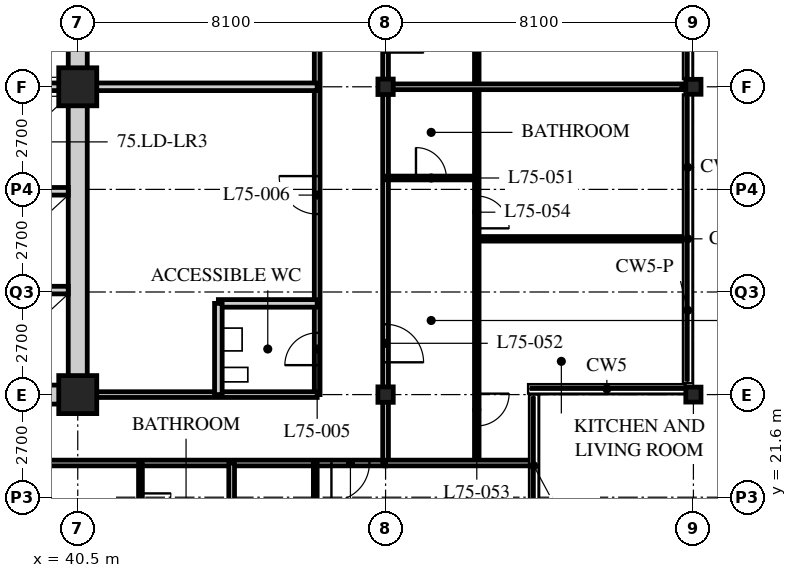
"""IFC4 building model, lengths in metres.
Left out: names, types, materials, properties, quantities, classifications, styles, units other than length and angle.
Written with IfcOpenShell. Run it as: python <this file> out.ifc"""

import sys

from ifc_helpers import new_model, si_unit, direction, frame, frame_2d, origin, origin_2d, place, context, subcontext, project, spatial, rectangle, hollow_rectangle, i_section, extrude, element, fill, save


model = new_model("IFC4")
c1 = context("Model", 3, precision=1e-05, world=origin(), true_north=direction((0.0, 1.0)))
c2 = subcontext(c1, "Body", "Model", "MODEL_VIEW")
j1 = project(units=[si_unit("LENGTHUNIT", "METRE"), si_unit("PLANEANGLEUNIT", "RADIAN")], contexts=[c1])
p1 = place(None, origin())
s1 = spatial("IfcSite", under=j1, at=p1, CompositionType="ELEMENT")
p2 = place(p1, origin())
s2 = spatial("IfcBuilding", under=s1, at=p2, CompositionType="ELEMENT")
p3 = place(p2, frame((0.0, 0.0, 293.1)))
s3 = spatial("IfcBuildingStorey", under=s2, at=p3, CompositionType="ELEMENT", Elevation=293.1)
for number, where, z_axis, x_axis in (
    (1, (40.5, 24.3, 0.0), (0.0, 0.0, 1.0), (1.0, 0.0, 0.0)),
    (2, (40.5, 32.4, 0.0), (0.0, 0.0, 1.0), (1.0, 0.0, 0.0)),
):
    element("IfcColumn", number, at=place(p3, frame(where, z_axis=z_axis, x_axis=x_axis)), inside=s3, PredefinedType="COLUMN", context=c2, shape_type="SweptSolid", body=[
        extrude(hollow_rectangle(XDim=1.0, YDim=1.0, WallThickness=0.1, at=origin_2d()), origin(), (0.0, 0.0, 1.0), 5.4),
    ])
for number, where, z_axis, x_axis in (
    (3, (48.6, 24.3, 0.0), (0.0, 0.0, 1.0), (1.0, 0.0, 0.0)),
    (4, (48.6, 32.4, 0.0), (0.0, 0.0, 1.0), (1.0, 0.0, 0.0)),
):
    element("IfcColumn", number, at=place(p3, frame(where, z_axis=z_axis, x_axis=x_axis)), inside=s3, PredefinedType="COLUMN", context=c2, shape_type="SweptSolid", body=[
        extrude(i_section(OverallWidth=0.403, OverallDepth=0.406, WebThickness=0.027, FlangeThickness=0.043, FilletRadius=0.015, at=origin_2d()), origin(), (0.0, 0.0, 1.0), 5.4),
    ])
for number, where, z_axis, x_axis in (
    (5, (56.7, 24.3, 0.0), (0.0, 0.0, 1.0), (1.0, 0.0, 0.0)),
    (6, (56.7, 32.4, 0.0), (0.0, 0.0, 1.0), (1.0, 0.0, 0.0)),
):
    element("IfcColumn", number, at=place(p3, frame(where, z_axis=z_axis, x_axis=x_axis)), inside=s3, PredefinedType="COLUMN", context=c2, shape_type="SweptSolid", body=[
        extrude(i_section(OverallWidth=0.399, OverallDepth=0.394, WebThickness=0.023, FlangeThickness=0.037, FilletRadius=0.015, at=origin_2d()), origin(), (0.0, 0.0, 1.0), 5.4),
    ])
p4 = place(p3, frame((8.1, 22.5, 0.0), z_axis=(0.0, 0.0, 1.0), x_axis=(1.0, 0.0, 0.0)))
e7 = element("IfcWall", 7, at=p4, inside=s3, PredefinedType="PARTITIONING", context=c2, shape_type="SweptSolid", body=[
    extrude(rectangle(XDim=40.5, YDim=0.15, at=frame_2d((20.25, 0.0))), origin(), (0.0, 0.0, 1.0), 5.19),
])
p5 = place(p4, frame((11.25, 0.0, 0.0)))
e8 = element("IfcOpeningElement", 8, at=p5, cuts=e7, PredefinedType="OPENING", context=c2, shape_type="SweptSolid", body=[
    extrude(rectangle(XDim=1.8, YDim=2.4, at=frame_2d((0.9, 1.2))), frame((0.0, 0.085, 0.0), z_axis=(0.0, -1.0, 0.0), x_axis=(1.0, 0.0, 0.0)), (0.0, 0.0, 1.0), 0.17),
])
p6 = place(p4, frame((23.4, 0.0, 0.0)))
e9 = element("IfcOpeningElement", 9, at=p6, cuts=e7, PredefinedType="OPENING", context=c2, shape_type="SweptSolid", body=[
    extrude(rectangle(XDim=1.8, YDim=2.4, at=frame_2d((0.9, 1.2))), frame((0.0, 0.085, 0.0), z_axis=(0.0, -1.0, 0.0), x_axis=(1.0, 0.0, 0.0)), (0.0, 0.0, 1.0), 0.17),
])
p7 = place(p4, frame((28.75, 0.0, 0.0)))
e10 = element("IfcOpeningElement", 10, at=p7, cuts=e7, PredefinedType="OPENING", context=c2, shape_type="SweptSolid", body=[
    extrude(rectangle(XDim=1.0, YDim=2.1, at=frame_2d((0.5, 1.05))), frame((0.0, 0.085, 0.0), z_axis=(0.0, -1.0, 0.0), x_axis=(1.0, 0.0, 0.0)), (0.0, 0.0, 1.0), 0.17),
])
p8 = place(p4, frame((0.425, 0.0, 0.0)))
e11 = element("IfcOpeningElement", 11, at=p8, cuts=e7, PredefinedType="OPENING", context=c2, shape_type="SweptSolid", body=[
    extrude(rectangle(XDim=1.0, YDim=2.1, at=frame_2d((0.5, 1.05))), frame((0.0, 0.085, 0.0), z_axis=(0.0, -1.0, 0.0), x_axis=(1.0, 0.0, 0.0)), (0.0, 0.0, 1.0), 0.17),
])
p9 = place(p4, frame((39.075, 0.0, 0.0)))
e12 = element("IfcOpeningElement", 12, at=p9, cuts=e7, PredefinedType="OPENING", context=c2, shape_type="SweptSolid", body=[
    extrude(rectangle(XDim=1.0, YDim=2.1, at=frame_2d((0.5, 1.05))), frame((0.0, 0.085, 0.0), z_axis=(0.0, -1.0, 0.0), x_axis=(1.0, 0.0, 0.0)), (0.0, 0.0, 1.0), 0.17),
])
p10 = place(p3, frame((48.6, 22.5, 0.0), z_axis=(0.0, 0.0, 1.0), x_axis=(0.0, 1.0, 0.0)))
e13 = element("IfcWall", 13, at=p10, inside=s3, PredefinedType="PARTITIONING", context=c2, shape_type="SweptSolid", body=[
    extrude(rectangle(XDim=34.2, YDim=0.15, at=frame_2d((17.1, 0.0))), origin(), (0.0, 0.0, 1.0), 4.271),
])
p11 = place(p10, frame((2.65, 0.0, 0.0)))
e14 = element("IfcOpeningElement", 14, at=p11, cuts=e13, PredefinedType="OPENING", context=c2, shape_type="SweptSolid", body=[
    extrude(rectangle(XDim=1.0, YDim=2.1, at=frame_2d((0.5, 1.05))), frame((0.0, 0.085, 0.0), z_axis=(0.0, -1.0, 0.0), x_axis=(1.0, 0.0, 0.0)), (0.0, 0.0, 1.0), 0.17),
])
p12 = place(p10, frame((10.8, 0.0, 0.0)))
e15 = element("IfcOpeningElement", 15, at=p12, cuts=e13, PredefinedType="OPENING", context=c2, shape_type="SweptSolid", body=[
    extrude(rectangle(XDim=1.0, YDim=2.1, at=frame_2d((0.5, 1.05))), frame((0.0, 0.085, 0.0), z_axis=(0.0, -1.0, 0.0), x_axis=(1.0, 0.0, 0.0)), (0.0, 0.0, 1.0), 0.17),
])
p13 = place(p10, frame((18.9, 0.0, 0.0)))
e16 = element("IfcOpeningElement", 16, at=p13, cuts=e13, PredefinedType="OPENING", context=c2, shape_type="SweptSolid", body=[
    extrude(rectangle(XDim=1.0, YDim=2.1, at=frame_2d((0.5, 1.05))), frame((0.0, 0.085, 0.0), z_axis=(0.0, -1.0, 0.0), x_axis=(1.0, 0.0, 0.0)), (0.0, 0.0, 1.0), 0.17),
])
p14 = place(p10, frame((27.0, 0.0, 0.0)))
e17 = element("IfcOpeningElement", 17, at=p14, cuts=e13, PredefinedType="OPENING", context=c2, shape_type="SweptSolid", body=[
    extrude(rectangle(XDim=1.0, YDim=2.1, at=frame_2d((0.5, 1.05))), frame((0.0, 0.085, 0.0), z_axis=(0.0, -1.0, 0.0), x_axis=(1.0, 0.0, 0.0)), (0.0, 0.0, 1.0), 0.17),
])
p15 = place(p3, frame((46.8, 24.3, 0.0), z_axis=(0.0, 0.0, 1.0), x_axis=(0.0, 1.0, 0.0)))
e18 = element("IfcWall", 18, at=p15, inside=s3, PredefinedType="PARTITIONING", context=c2, shape_type="SweptSolid", body=[
    extrude(rectangle(XDim=30.6, YDim=0.15, at=frame_2d((15.3, 0.0))), origin(), (0.0, 0.0, 1.0), 5.19),
])
p16 = place(p15, frame((0.775, 0.0, 0.0)))
e19 = element("IfcOpeningElement", 19, at=p16, cuts=e18, PredefinedType="OPENING", context=c2, shape_type="SweptSolid", body=[
    extrude(rectangle(XDim=0.85, YDim=2.1, at=frame_2d((0.425, 1.05))), frame((0.0, 0.085, 0.0), z_axis=(0.0, -1.0, 0.0), x_axis=(1.0, 0.0, 0.0)), (0.0, 0.0, 1.0), 0.17),
])
p17 = place(p15, frame((4.75, 0.0, 0.0)))
e20 = element("IfcOpeningElement", 20, at=p17, cuts=e18, PredefinedType="OPENING", context=c2, shape_type="SweptSolid", body=[
    extrude(rectangle(XDim=1.0, YDim=2.1, at=frame_2d((0.5, 1.05))), frame((0.0, 0.085, 0.0), z_axis=(0.0, -1.0, 0.0), x_axis=(1.0, 0.0, 0.0)), (0.0, 0.0, 1.0), 0.17),
])
p18 = place(p15, frame((11.65, 0.0, 0.0)))
e21 = element("IfcOpeningElement", 21, at=p18, cuts=e18, PredefinedType="OPENING", context=c2, shape_type="SweptSolid", body=[
    extrude(rectangle(XDim=1.0, YDim=2.1, at=frame_2d((0.5, 1.05))), frame((0.0, 0.085, 0.0), z_axis=(0.0, -1.0, 0.0), x_axis=(1.0, 0.0, 0.0)), (0.0, 0.0, 1.0), 0.17),
])
p19 = place(p3, frame((40.7, 24.3, 0.0), z_axis=(0.0, 0.0, 1.0), x_axis=(1.0, 0.0, 0.0)))
e22 = element("IfcWall", 22, at=p19, inside=s3, PredefinedType="PARTITIONING", context=c2, shape_type="SweptSolid", body=[
    extrude(rectangle(XDim=6.1, YDim=0.15, at=frame_2d((3.05, 0.0))), origin(), (0.0, 0.0, 1.0), 4.271),
])
p20 = place(p3, frame((40.5, 32.4, 0.0), z_axis=(0.0, 0.0, 1.0), x_axis=(1.0, 0.0, 0.0)))
e23 = element("IfcWall", 23, at=p20, inside=s3, PredefinedType="SOLIDWALL", context=c2, shape_type="SweptSolid", body=[
    extrude(rectangle(XDim=6.3, YDim=0.2, at=frame_2d((3.15, 0.0))), origin(), (0.0, 0.0, 1.0), 4.271),
])
p21 = place(p3, frame((46.8, 26.7, 0.0), z_axis=(0.0, 0.0, 1.0), x_axis=(-1.0, 0.0, 0.0)))
e24 = element("IfcWall", 24, at=p21, inside=s3, PredefinedType="SOLIDWALL", context=c2, shape_type="SweptSolid", body=[
    extrude(rectangle(XDim=2.6, YDim=0.2, at=frame_2d((1.3, 0.0))), origin(), (0.0, 0.0, 1.0), 5.19),
])
p22 = place(p3, frame((44.2, 24.3, 0.0), z_axis=(0.0, 0.0, 1.0), x_axis=(0.0, 1.0, 0.0)))
e25 = element("IfcWall", 25, at=p22, inside=s3, PredefinedType="SOLIDWALL", context=c2, shape_type="SweptSolid", body=[
    extrude(rectangle(XDim=2.4, YDim=0.2, at=frame_2d((1.2, 0.0))), origin(), (0.0, 0.0, 1.0), 5.19),
])
p23 = place(p3, frame((42.15, 22.5, 0.0), z_axis=(0.0, 0.0, 1.0), x_axis=(0.0, -1.0, 0.0)))
e26 = element("IfcWall", 26, at=p23, inside=s3, PredefinedType="PARTITIONING", context=c2, shape_type="SweptSolid", body=[
    extrude(rectangle(XDim=2.4, YDim=0.1, at=frame_2d((1.2, 0.0))), origin(), (0.0, 0.0, 1.0), 5.19),
])
p24 = place(p23, frame((0.8, 0.0, 0.0)))
e27 = element("IfcOpeningElement", 27, at=p24, cuts=e26, PredefinedType="OPENING", context=c2, shape_type="SweptSolid", body=[
    extrude(rectangle(XDim=0.8, YDim=2.1, at=frame_2d((0.4, 1.05))), frame((0.0, 0.06, 0.0), z_axis=(0.0, -1.0, 0.0), x_axis=(1.0, 0.0, 0.0)), (0.0, 0.0, 1.0), 0.12),
])
p25 = place(p3, frame((51.0, 22.5, 0.0), z_axis=(0.0, 0.0, 1.0), x_axis=(0.0, 1.0, 0.0)))
e28 = element("IfcWall", 28, at=p25, inside=s3, PredefinedType="PARTITIONING", context=c2, shape_type="SweptSolid", body=[
    extrude(rectangle(XDim=34.2, YDim=0.12, at=frame_2d((17.1, 0.0))), origin(), (0.0, 0.0, 1.0), 5.19),
])
p26 = place(p25, frame((0.975, 0.0, 0.0)))
e29 = element("IfcOpeningElement", 29, at=p26, cuts=e28, PredefinedType="OPENING", context=c2, shape_type="SweptSolid", body=[
    extrude(rectangle(XDim=0.85, YDim=2.1, at=frame_2d((0.425, 1.05))), frame((0.0, 0.07, 0.0), z_axis=(0.0, -1.0, 0.0), x_axis=(1.0, 0.0, 0.0)), (0.0, 0.0, 1.0), 0.14),
])
p27 = place(p25, frame((6.175, 0.0, 0.0)))
e30 = element("IfcOpeningElement", 30, at=p27, cuts=e28, PredefinedType="OPENING", context=c2, shape_type="SweptSolid", body=[
    extrude(rectangle(XDim=0.85, YDim=2.1, at=frame_2d((0.425, 1.05))), frame((0.0, 0.07, 0.0), z_axis=(0.0, -1.0, 0.0), x_axis=(1.0, 0.0, 0.0)), (0.0, 0.0, 1.0), 0.14),
])
p28 = place(p25, frame((10.875, 0.0, 0.0)))
e31 = element("IfcOpeningElement", 31, at=p28, cuts=e28, PredefinedType="OPENING", context=c2, shape_type="SweptSolid", body=[
    extrude(rectangle(XDim=0.85, YDim=2.1, at=frame_2d((0.425, 1.05))), frame((0.0, 0.07, 0.0), z_axis=(0.0, -1.0, 0.0), x_axis=(1.0, 0.0, 0.0)), (0.0, 0.0, 1.0), 0.14),
])
p29 = place(p25, frame((14.275, 0.0, 0.0)))
e32 = element("IfcOpeningElement", 32, at=p29, cuts=e28, PredefinedType="OPENING", context=c2, shape_type="SweptSolid", body=[
    extrude(rectangle(XDim=0.85, YDim=2.1, at=frame_2d((0.425, 1.05))), frame((0.0, 0.07, 0.0), z_axis=(0.0, -1.0, 0.0), x_axis=(1.0, 0.0, 0.0)), (0.0, 0.0, 1.0), 0.14),
])
p30 = place(p25, frame((18.975, 0.0, 0.0)))
e33 = element("IfcOpeningElement", 33, at=p30, cuts=e28, PredefinedType="OPENING", context=c2, shape_type="SweptSolid", body=[
    extrude(rectangle(XDim=0.85, YDim=2.1, at=frame_2d((0.425, 1.05))), frame((0.0, 0.07, 0.0), z_axis=(0.0, -1.0, 0.0), x_axis=(1.0, 0.0, 0.0)), (0.0, 0.0, 1.0), 0.14),
])
p31 = place(p25, frame((22.375, 0.0, 0.0)))
e34 = element("IfcOpeningElement", 34, at=p31, cuts=e28, PredefinedType="OPENING", context=c2, shape_type="SweptSolid", body=[
    extrude(rectangle(XDim=0.85, YDim=2.1, at=frame_2d((0.425, 1.05))), frame((0.0, 0.07, 0.0), z_axis=(0.0, -1.0, 0.0), x_axis=(1.0, 0.0, 0.0)), (0.0, 0.0, 1.0), 0.14),
])
p32 = place(p25, frame((27.075, 0.0, 0.0)))
e35 = element("IfcOpeningElement", 35, at=p32, cuts=e28, PredefinedType="OPENING", context=c2, shape_type="SweptSolid", body=[
    extrude(rectangle(XDim=0.85, YDim=2.1, at=frame_2d((0.425, 1.05))), frame((0.0, 0.07, 0.0), z_axis=(0.0, -1.0, 0.0), x_axis=(1.0, 0.0, 0.0)), (0.0, 0.0, 1.0), 0.14),
])
p33 = place(p25, frame((30.475, 0.0, 0.0)))
e36 = element("IfcOpeningElement", 36, at=p33, cuts=e28, PredefinedType="OPENING", context=c2, shape_type="SweptSolid", body=[
    extrude(rectangle(XDim=0.85, YDim=2.1, at=frame_2d((0.425, 1.05))), frame((0.0, 0.07, 0.0), z_axis=(0.0, -1.0, 0.0), x_axis=(1.0, 0.0, 0.0)), (0.0, 0.0, 1.0), 0.14),
])
p34 = place(p3, frame((48.6, 30.0, 0.0), z_axis=(0.0, 0.0, 1.0), x_axis=(1.0, 0.0, 0.0)))
e37 = element("IfcWall", 37, at=p34, inside=s3, PredefinedType="PARTITIONING", context=c2, shape_type="SweptSolid", body=[
    extrude(rectangle(XDim=2.4, YDim=0.1, at=frame_2d((1.2, 0.0))), origin(), (0.0, 0.0, 1.0), 5.19),
])
p35 = place(p34, frame((0.8, 0.0, 0.0)))
e38 = element("IfcOpeningElement", 38, at=p35, cuts=e37, PredefinedType="OPENING", context=c2, shape_type="SweptSolid", body=[
    extrude(rectangle(XDim=0.8, YDim=2.1, at=frame_2d((0.4, 1.05))), frame((0.0, 0.06, 0.0), z_axis=(0.0, -1.0, 0.0), x_axis=(1.0, 0.0, 0.0)), (0.0, 0.0, 1.0), 0.12),
])
p36 = place(p3, frame((51.0, 28.399, 0.0), z_axis=(0.0, 0.0, 1.0), x_axis=(1.0, 0.0, 0.0)))
e39 = element("IfcWall", 39, at=p36, inside=s3, PredefinedType="PARTITIONING", context=c2, shape_type="SweptSolid", body=[
    extrude(rectangle(XDim=5.422, YDim=0.12, at=frame_2d((2.711, 0.0))), origin(), (0.0, 0.0, 1.0), 5.19),
])
p37 = place(p3, frame((48.6, 32.4, 0.0), z_axis=(0.0, 0.0, 1.0), x_axis=(1.0, 0.0, 0.0)))
e40 = element("IfcWall", 40, at=p37, inside=s3, PredefinedType="PARTITIONING", context=c2, shape_type="SweptSolid", body=[
    extrude(rectangle(XDim=7.8, YDim=0.15, at=frame_2d((3.9, 0.0))), origin(), (0.0, 0.0, 1.0), 4.271),
])
p38 = place(p3, frame((46.75, 22.5, 0.0), z_axis=(0.0, 0.0, 1.0), x_axis=(0.0, -1.0, 0.0)))
e41 = element("IfcWall", 41, at=p38, inside=s3, PredefinedType="PARTITIONING", context=c2, shape_type="SweptSolid", body=[
    extrude(rectangle(XDim=2.4, YDim=0.1, at=frame_2d((1.2, 0.0))), origin(), (0.0, 0.0, 1.0), 5.19),
])
p39 = place(p38, frame((1.35, 0.0, 0.0)))
e42 = element("IfcOpeningElement", 42, at=p39, cuts=e41, PredefinedType="OPENING", context=c2, shape_type="SweptSolid", body=[
    extrude(rectangle(XDim=0.8, YDim=2.1, at=frame_2d((0.4, 1.05))), frame((0.0, 0.06, 0.0), z_axis=(0.0, -1.0, 0.0), x_axis=(1.0, 0.0, 0.0)), (0.0, 0.0, 1.0), 0.12),
])
p40 = place(p3, frame((48.6, 22.5, 0.0), z_axis=(0.0, 0.0, 1.0), x_axis=(1.0, 0.0, 0.0)))
e43 = element("IfcWall", 43, at=p40, inside=s3, PredefinedType="PARTITIONING", context=c2, shape_type="SweptSolid", body=[
    extrude(rectangle(XDim=3.879, YDim=0.15, at=frame_2d((1.939, 0.0))), origin(), (0.0, 0.0, 1.0), 5.19),
])
p41 = place(p3, frame((44.55, 22.5, 0.0), z_axis=(0.0, 0.0, 1.0), x_axis=(0.0, -1.0, 0.0)))
e44 = element("IfcWall", 44, at=p41, inside=s3, PredefinedType="PARTITIONING", context=c2, shape_type="SweptSolid", body=[
    extrude(rectangle(XDim=6.022, YDim=0.15, at=frame_2d((3.011, 0.0))), origin(), (0.0, 0.0, 1.0), 5.19),
])
p42 = place(p3, frame((15.95, 24.3, 0.0), z_axis=(0.0, 0.0, 1.0), x_axis=(1.0, 0.0, 0.0)))
e45 = element("IfcWall", 45, at=p42, inside=s3, PredefinedType="SOLIDWALL", context=c2, shape_type="SweptSolid", body=[
    extrude(rectangle(XDim=24.8, YDim=0.5, at=frame_2d((12.4, 0.0))), origin(), (0.0, 0.0, 1.0), 4.271),
])
p43 = place(p42, frame((11.5, 0.0, 0.0)))
e46 = element("IfcOpeningElement", 46, at=p43, cuts=e45, PredefinedType="OPENING", context=c2, shape_type="SweptSolid", body=[
    extrude(rectangle(XDim=1.8, YDim=2.4, at=frame_2d((0.9, 1.2))), frame((0.0, 0.26, 0.0), z_axis=(0.0, -1.0, 0.0), x_axis=(1.0, 0.0, 0.0)), (0.0, 0.0, 1.0), 0.52),
])
p44 = place(p3, frame((40.5, 24.55, 0.0), z_axis=(0.0, 0.0, 1.0), x_axis=(0.0, 1.0, 0.0)))
e47 = element("IfcWall", 47, at=p44, inside=s3, PredefinedType="SOLIDWALL", context=c2, shape_type="SweptSolid", body=[
    extrude(rectangle(XDim=15.7, YDim=0.5, at=frame_2d((7.85, 0.0))), origin(), (0.0, 0.0, 1.0), 4.271),
])
p45 = place(p3, frame((32.3, 32.4, 0.0), z_axis=(0.0, 0.0, 1.0), x_axis=(1.0, 0.0, 0.0)))
e48 = element("IfcWall", 48, at=p45, inside=s3, PredefinedType="SOLIDWALL", context=c2, shape_type="SweptSolid", body=[
    extrude(rectangle(XDim=7.95, YDim=0.2, at=frame_2d((3.975, 0.0))), origin(), (0.0, 0.0, 1.0), 4.428),
])
for number, where, z_axis, x_axis in (
    (49, (37.65, 27.05, 0.0), (0.0, 0.0, 1.0), (1.0, 0.0, 0.0)),
    (50, (37.65, 29.65, 0.0), (0.0, 0.0, 1.0), (1.0, 0.0, 0.0)),
):
    element("IfcWall", number, at=place(p3, frame(where, z_axis=z_axis, x_axis=x_axis)), inside=s3, PredefinedType="SOLIDWALL", context=c2, shape_type="SweptSolid", body=[
        extrude(rectangle(XDim=2.6, YDim=0.2, at=frame_2d((1.3, 0.0))), origin(), (0.0, 0.0, 1.0), 5.19),
    ])
p46 = place(p16, origin())
e51 = element("IfcDoor", 51, at=p46, inside=s3, OperationType="SINGLE_SWING_LEFT", PredefinedType="DOOR", context=c2, shape_type="SweptSolid", body=[
    extrude(rectangle(XDim=0.85, YDim=2.1, at=frame_2d((0.425, 1.05))), frame((0.0, 0.025, 0.0), z_axis=(0.0, -1.0, 0.0), x_axis=(1.0, 0.0, 0.0)), (0.0, 0.0, 1.0), 0.05),
])
fill(e19, e51)
p47 = place(p17, origin())
e52 = element("IfcDoor", 52, at=p47, inside=s3, OperationType="SINGLE_SWING_RIGHT", PredefinedType="DOOR", context=c2, shape_type="SweptSolid", body=[
    extrude(rectangle(XDim=1.0, YDim=2.1, at=frame_2d((0.5, 1.05))), frame((0.0, 0.025, 0.0), z_axis=(0.0, -1.0, 0.0), x_axis=(1.0, 0.0, 0.0)), (0.0, 0.0, 1.0), 0.05),
])
fill(e20, e52)
p48 = place(p24, origin())
e53 = element("IfcDoor", 53, at=p48, inside=s3, OperationType="SINGLE_SWING_LEFT", PredefinedType="DOOR", context=c2, shape_type="SweptSolid", body=[
    extrude(rectangle(XDim=0.8, YDim=2.1, at=frame_2d((0.4, 1.05))), frame((0.0, 0.025, 0.0), z_axis=(0.0, -1.0, 0.0), x_axis=(1.0, 0.0, 0.0)), (0.0, 0.0, 1.0), 0.05),
])
fill(e27, e53)
p49 = place(p35, origin())
e54 = element("IfcDoor", 54, at=p49, inside=s3, OperationType="SINGLE_SWING_LEFT", PredefinedType="DOOR", context=c2, shape_type="SweptSolid", body=[
    extrude(rectangle(XDim=0.8, YDim=2.1, at=frame_2d((0.4, 1.05))), frame((0.0, 0.025, 0.0), z_axis=(0.0, -1.0, 0.0), x_axis=(1.0, 0.0, 0.0)), (0.0, 0.0, 1.0), 0.05),
])
fill(e38, e54)
p50 = place(p11, origin())
e55 = element("IfcDoor", 55, at=p50, inside=s3, OperationType="SINGLE_SWING_RIGHT", PredefinedType="DOOR", context=c2, shape_type="SweptSolid", body=[
    extrude(rectangle(XDim=1.0, YDim=2.1, at=frame_2d((0.5, 1.05))), frame((0.0, 0.025, 0.0), z_axis=(0.0, -1.0, 0.0), x_axis=(1.0, 0.0, 0.0)), (0.0, 0.0, 1.0), 0.05),
])
fill(e14, e55)
p51 = place(p26, origin())
e56 = element("IfcDoor", 56, at=p51, inside=s3, OperationType="SINGLE_SWING_LEFT", PredefinedType="DOOR", context=c2, shape_type="SweptSolid", body=[
    extrude(rectangle(XDim=0.85, YDim=2.1, at=frame_2d((0.425, 1.05))), frame((0.0, 0.025, 0.0), z_axis=(0.0, -1.0, 0.0), x_axis=(1.0, 0.0, 0.0)), (0.0, 0.0, 1.0), 0.05),
])
fill(e29, e56)
p52 = place(p27, origin())
e57 = element("IfcDoor", 57, at=p52, inside=s3, OperationType="SINGLE_SWING_RIGHT", PredefinedType="DOOR", context=c2, shape_type="SweptSolid", body=[
    extrude(rectangle(XDim=0.85, YDim=2.1, at=frame_2d((0.425, 1.05))), frame((0.0, 0.025, 0.0), z_axis=(0.0, -1.0, 0.0), x_axis=(1.0, 0.0, 0.0)), (0.0, 0.0, 1.0), 0.05),
])
fill(e30, e57)
p53 = place(p12, origin())
e58 = element("IfcDoor", 58, at=p53, inside=s3, OperationType="SINGLE_SWING_RIGHT", PredefinedType="DOOR", context=c2, shape_type="SweptSolid", body=[
    extrude(rectangle(XDim=1.0, YDim=2.1, at=frame_2d((0.5, 1.05))), frame((0.0, 0.025, 0.0), z_axis=(0.0, -1.0, 0.0), x_axis=(1.0, 0.0, 0.0)), (0.0, 0.0, 1.0), 0.05),
])
fill(e15, e58)
p54 = place(p9, origin())
e59 = element("IfcDoor", 59, at=p54, inside=s3, OperationType="SINGLE_SWING_RIGHT", PredefinedType="DOOR", context=c2, shape_type="SweptSolid", body=[
    extrude(rectangle(XDim=1.0, YDim=2.1, at=frame_2d((0.5, 1.05))), frame((0.0, 0.025, 0.0), z_axis=(0.0, -1.0, 0.0), x_axis=(1.0, 0.0, 0.0)), (0.0, 0.0, 1.0), 0.05),
])
fill(e12, e59)
save(model, sys.argv[1])
